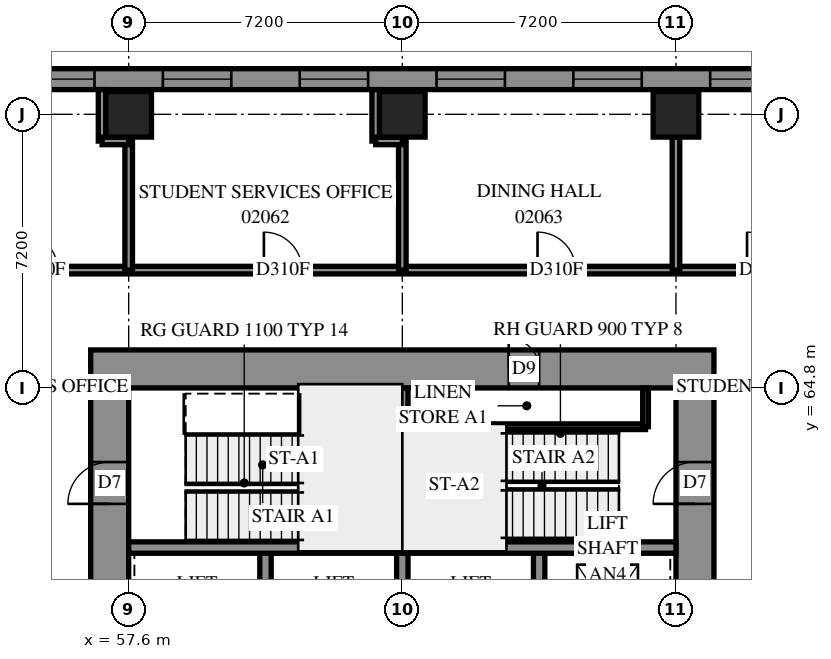
"""IFC4 building model, lengths in metres.
Left out: names, types, materials, properties, quantities, classifications, styles, units other than length and angle.
Written with IfcOpenShell. Run it as: python <this file> out.ifc"""

import sys

from ifc_helpers import new_model, si_unit, direction, frame, frame_2d, origin, origin_2d, place, context, subcontext, project, spatial, polyline, rectangle, outline, extrude, element, fill, save


model = new_model("IFC4")
c1 = context("Model", 3, precision=1e-05, world=origin(), true_north=direction((0.0, 1.0)))
c2 = subcontext(c1, "Body", "Model", "MODEL_VIEW")
j1 = project(units=[si_unit("LENGTHUNIT", "METRE"), si_unit("PLANEANGLEUNIT", "RADIAN")], contexts=[c1])
p1 = place(None, origin())
s1 = spatial("IfcSite", under=j1, at=p1, CompositionType="ELEMENT")
p2 = place(p1, origin())
s2 = spatial("IfcBuilding", under=s1, at=p2, CompositionType="ELEMENT")
p3 = place(p2, frame((0.0, 0.0, 10.2)))
s3 = spatial("IfcBuildingStorey", under=s2, at=p3, CompositionType="ELEMENT", Elevation=10.2)
for number, where, z_axis, x_axis in (
    (1, (57.6, 72.0, 0.0), (0.0, 0.0, 1.0), (1.0, 0.0, 0.0)),
    (2, (64.8, 72.0, 0.0), (0.0, 0.0, 1.0), (1.0, 0.0, 0.0)),
    (3, (72.0, 72.0, 0.0), (0.0, 0.0, 1.0), (1.0, 0.0, 0.0)),
):
    element("IfcColumn", number, at=place(p3, frame(where, z_axis=z_axis, x_axis=x_axis)), inside=s3, PredefinedType="COLUMN", context=c2, shape_type="SweptSolid", body=[
        extrude(rectangle(XDim=1.2, YDim=1.2, at=origin_2d()), origin(), (0.0, 0.0, 1.0), 3.8),
    ])
p4 = place(p3, frame((56.6, 65.3, -0.4), z_axis=(0.0, 0.0, 1.0), x_axis=(1.0, 0.0, 0.0)))
e4 = element("IfcWall", 4, at=p4, inside=s3, PredefinedType="SHEAR", context=c2, shape_type="SweptSolid", body=[
    extrude(rectangle(XDim=16.4, YDim=1.0, at=frame_2d((8.2, 0.0))), origin(), (0.0, 0.0, 1.0), 3.5),
])
p5 = place(p4, frame((11.0, 0.0, 0.4)))
e5 = element("IfcOpeningElement", 5, at=p5, cuts=e4, PredefinedType="OPENING", context=c2, shape_type="SweptSolid", body=[
    extrude(rectangle(XDim=0.8, YDim=2.1, at=frame_2d((0.4, 1.05))), frame((0.0, 0.51, 0.0), z_axis=(0.0, -1.0, 0.0), x_axis=(1.0, 0.0, 0.0)), (0.0, 0.0, 1.0), 1.02),
])
p6 = place(p3, frame((57.1, 50.4, -0.4), z_axis=(0.0, 0.0, 1.0), x_axis=(0.0, 1.0, 0.0)))
e6 = element("IfcWall", 6, at=p6, inside=s3, PredefinedType="SHEAR", context=c2, shape_type="SweptSolid", body=[
    extrude(rectangle(XDim=14.4, YDim=1.0, at=frame_2d((7.2, 0.0))), origin(), (0.0, 0.0, 1.0), 3.5),
])
p7 = place(p6, frame((4.55, 0.0, 0.4)))
e7 = element("IfcOpeningElement", 7, at=p7, cuts=e6, PredefinedType="OPENING", context=c2, shape_type="SweptSolid", body=[
    extrude(rectangle(XDim=1.1, YDim=2.1, at=frame_2d((0.55, 1.05))), frame((0.0, 0.51, 0.0), z_axis=(0.0, -1.0, 0.0), x_axis=(1.0, 0.0, 0.0)), (0.0, 0.0, 1.0), 1.02),
])
p8 = place(p6, frame((11.35, 0.0, 0.4)))
e8 = element("IfcOpeningElement", 8, at=p8, cuts=e6, PredefinedType="OPENING", context=c2, shape_type="SweptSolid", body=[
    extrude(rectangle(XDim=1.1, YDim=2.1, at=frame_2d((0.55, 1.05))), frame((0.0, 0.51, 0.0), z_axis=(0.0, -1.0, 0.0), x_axis=(1.0, 0.0, 0.0)), (0.0, 0.0, 1.0), 1.02),
])
p9 = place(p3, frame((72.5, 50.4, -0.4), z_axis=(0.0, 0.0, 1.0), x_axis=(0.0, 1.0, 0.0)))
e9 = element("IfcWall", 9, at=p9, inside=s3, PredefinedType="SHEAR", context=c2, shape_type="SweptSolid", body=[
    extrude(rectangle(XDim=14.4, YDim=1.0, at=frame_2d((7.2, 0.0))), origin(), (0.0, 0.0, 1.0), 3.5),
])
p10 = place(p9, frame((4.55, 0.0, 0.4)))
e10 = element("IfcOpeningElement", 10, at=p10, cuts=e9, PredefinedType="OPENING", context=c2, shape_type="SweptSolid", body=[
    extrude(rectangle(XDim=1.1, YDim=2.1, at=frame_2d((0.55, 1.05))), frame((0.0, 0.51, 0.0), z_axis=(0.0, -1.0, 0.0), x_axis=(1.0, 0.0, 0.0)), (0.0, 0.0, 1.0), 1.02),
])
p11 = place(p9, frame((11.35, 0.0, 0.4)))
e11 = element("IfcOpeningElement", 11, at=p11, cuts=e9, PredefinedType="OPENING", context=c2, shape_type="SweptSolid", body=[
    extrude(rectangle(XDim=1.1, YDim=2.1, at=frame_2d((0.55, 1.05))), frame((0.0, 0.51, 0.0), z_axis=(0.0, -1.0, 0.0), x_axis=(1.0, 0.0, 0.0)), (0.0, 0.0, 1.0), 1.02),
])
for number, where, z_axis, x_axis in (
    (12, (61.2, 57.3, 0.0), (0.0, 0.0, 1.0), (0.0, 1.0, 0.0)),
    (13, (64.8, 57.3, 0.0), (0.0, 0.0, 1.0), (0.0, 1.0, 0.0)),
    (14, (68.4, 57.3, 0.0), (0.0, 0.0, 1.0), (0.0, 1.0, 0.0)),
):
    element("IfcWall", number, at=place(p3, frame(where, z_axis=z_axis, x_axis=x_axis)), inside=s3, PredefinedType="SOLIDWALL", context=c2, shape_type="SweptSolid", body=[
        extrude(rectangle(XDim=3.3, YDim=0.3, at=frame_2d((1.65, 0.0))), origin(), (0.0, 0.0, 1.0), 3.8),
    ])
for number, where, z_axis, x_axis in (
    (15, (57.6, 60.6, 0.0), (0.0, 0.0, 1.0), (1.0, 0.0, 0.0)),
    (16, (64.8, 60.6, 0.0), (0.0, 0.0, 1.0), (1.0, 0.0, 0.0)),
):
    element("IfcWall", number, at=place(p3, frame(where, z_axis=z_axis, x_axis=x_axis)), inside=s3, PredefinedType="SOLIDWALL", context=c2, shape_type="SweptSolid", body=[
        extrude(rectangle(XDim=7.2, YDim=0.3, at=frame_2d((3.6, 0.0))), origin(), (0.0, 0.0, 1.0), 3.8),
    ])
p12 = place(p3, frame((64.8, 60.6, 0.0), z_axis=(0.0, 0.0, 1.0), x_axis=(0.0, 1.0, 0.0)))
e17 = element("IfcWall", 17, at=p12, inside=s3, PredefinedType="SOLIDWALL", context=c2, shape_type="SweptSolid", body=[
    extrude(rectangle(XDim=4.2, YDim=0.3, at=frame_2d((2.1, 0.0))), origin(), (0.0, 0.0, 1.0), 3.8),
])
p13 = place(p3, frame((79.583, 72.925, 0.0), z_axis=(0.0, 0.0, 1.0), x_axis=(-1.0, 0.0, 0.0)))
e18 = element("IfcWall", 18, at=p13, inside=s3, PredefinedType="SOLIDWALL", context=c2, shape_type="SweptSolid", body=[
    extrude(outline(polyline([(-0.114, -0.275), (79.583, -0.275), (79.033, 0.275), (0.114, 0.275), (-0.114, -0.275)])), origin(), (0.0, 0.0, 1.0), 3.8),
])
p14 = place(p13, frame((1.249, 0.0, 0.7)))
e19 = element("IfcOpeningElement", 19, at=p14, cuts=e18, PredefinedType="OPENING", context=c2, shape_type="SweptSolid", body=[
    extrude(rectangle(XDim=1.8, YDim=2.6, at=frame_2d((0.9, 1.3))), frame((0.0, 0.285, 0.0), z_axis=(0.0, -1.0, 0.0), x_axis=(1.0, 0.0, 0.0)), (0.0, 0.0, 1.0), 0.57),
])
p15 = place(p13, frame((4.883, 0.0, 0.7)))
e20 = element("IfcOpeningElement", 20, at=p15, cuts=e18, PredefinedType="OPENING", context=c2, shape_type="SweptSolid", body=[
    extrude(rectangle(XDim=1.8, YDim=2.6, at=frame_2d((0.9, 1.3))), frame((0.0, 0.285, 0.0), z_axis=(0.0, -1.0, 0.0), x_axis=(1.0, 0.0, 0.0)), (0.0, 0.0, 1.0), 0.57),
])
p16 = place(p13, frame((8.483, 0.0, 0.7)))
e21 = element("IfcOpeningElement", 21, at=p16, cuts=e18, PredefinedType="OPENING", context=c2, shape_type="SweptSolid", body=[
    extrude(rectangle(XDim=1.8, YDim=2.6, at=frame_2d((0.9, 1.3))), frame((0.0, 0.285, 0.0), z_axis=(0.0, -1.0, 0.0), x_axis=(1.0, 0.0, 0.0)), (0.0, 0.0, 1.0), 0.57),
])
p17 = place(p13, frame((12.083, 0.0, 0.7)))
e22 = element("IfcOpeningElement", 22, at=p17, cuts=e18, PredefinedType="OPENING", context=c2, shape_type="SweptSolid", body=[
    extrude(rectangle(XDim=1.8, YDim=2.6, at=frame_2d((0.9, 1.3))), frame((0.0, 0.285, 0.0), z_axis=(0.0, -1.0, 0.0), x_axis=(1.0, 0.0, 0.0)), (0.0, 0.0, 1.0), 0.57),
])
p18 = place(p13, frame((15.683, 0.0, 0.7)))
e23 = element("IfcOpeningElement", 23, at=p18, cuts=e18, PredefinedType="OPENING", context=c2, shape_type="SweptSolid", body=[
    extrude(rectangle(XDim=1.8, YDim=2.6, at=frame_2d((0.9, 1.3))), frame((0.0, 0.285, 0.0), z_axis=(0.0, -1.0, 0.0), x_axis=(1.0, 0.0, 0.0)), (0.0, 0.0, 1.0), 0.57),
])
p19 = place(p13, frame((19.283, 0.0, 0.7)))
e24 = element("IfcOpeningElement", 24, at=p19, cuts=e18, PredefinedType="OPENING", context=c2, shape_type="SweptSolid", body=[
    extrude(rectangle(XDim=1.8, YDim=2.6, at=frame_2d((0.9, 1.3))), frame((0.0, 0.285, 0.0), z_axis=(0.0, -1.0, 0.0), x_axis=(1.0, 0.0, 0.0)), (0.0, 0.0, 1.0), 0.57),
])
p20 = place(p13, frame((22.883, 0.0, 0.7)))
e25 = element("IfcOpeningElement", 25, at=p20, cuts=e18, PredefinedType="OPENING", context=c2, shape_type="SweptSolid", body=[
    extrude(rectangle(XDim=1.8, YDim=2.6, at=frame_2d((0.9, 1.3))), frame((0.0, 0.285, 0.0), z_axis=(0.0, -1.0, 0.0), x_axis=(1.0, 0.0, 0.0)), (0.0, 0.0, 1.0), 0.57),
])
p21 = place(p13, frame((26.483, 0.0, 0.7)))
e26 = element("IfcOpeningElement", 26, at=p21, cuts=e18, PredefinedType="OPENING", context=c2, shape_type="SweptSolid", body=[
    extrude(rectangle(XDim=1.8, YDim=2.6, at=frame_2d((0.9, 1.3))), frame((0.0, 0.285, 0.0), z_axis=(0.0, -1.0, 0.0), x_axis=(1.0, 0.0, 0.0)), (0.0, 0.0, 1.0), 0.57),
])
p22 = place(p13, frame((30.083, 0.0, 0.7)))
e27 = element("IfcOpeningElement", 27, at=p22, cuts=e18, PredefinedType="OPENING", context=c2, shape_type="SweptSolid", body=[
    extrude(rectangle(XDim=1.8, YDim=2.6, at=frame_2d((0.9, 1.3))), frame((0.0, 0.285, 0.0), z_axis=(0.0, -1.0, 0.0), x_axis=(1.0, 0.0, 0.0)), (0.0, 0.0, 1.0), 0.57),
])
p23 = place(p13, frame((33.683, 0.0, 0.7)))
e28 = element("IfcOpeningElement", 28, at=p23, cuts=e18, PredefinedType="OPENING", context=c2, shape_type="SweptSolid", body=[
    extrude(rectangle(XDim=1.8, YDim=2.6, at=frame_2d((0.9, 1.3))), frame((0.0, 0.285, 0.0), z_axis=(0.0, -1.0, 0.0), x_axis=(1.0, 0.0, 0.0)), (0.0, 0.0, 1.0), 0.57),
])
p24 = place(p13, frame((37.283, 0.0, 0.7)))
e29 = element("IfcOpeningElement", 29, at=p24, cuts=e18, PredefinedType="OPENING", context=c2, shape_type="SweptSolid", body=[
    extrude(rectangle(XDim=1.8, YDim=2.6, at=frame_2d((0.9, 1.3))), frame((0.0, 0.285, 0.0), z_axis=(0.0, -1.0, 0.0), x_axis=(1.0, 0.0, 0.0)), (0.0, 0.0, 1.0), 0.57),
])
p25 = place(p13, frame((40.883, 0.0, 0.7)))
e30 = element("IfcOpeningElement", 30, at=p25, cuts=e18, PredefinedType="OPENING", context=c2, shape_type="SweptSolid", body=[
    extrude(rectangle(XDim=1.8, YDim=2.6, at=frame_2d((0.9, 1.3))), frame((0.0, 0.285, 0.0), z_axis=(0.0, -1.0, 0.0), x_axis=(1.0, 0.0, 0.0)), (0.0, 0.0, 1.0), 0.57),
])
p26 = place(p13, frame((44.483, 0.0, 0.7)))
e31 = element("IfcOpeningElement", 31, at=p26, cuts=e18, PredefinedType="OPENING", context=c2, shape_type="SweptSolid", body=[
    extrude(rectangle(XDim=1.8, YDim=2.6, at=frame_2d((0.9, 1.3))), frame((0.0, 0.285, 0.0), z_axis=(0.0, -1.0, 0.0), x_axis=(1.0, 0.0, 0.0)), (0.0, 0.0, 1.0), 0.57),
])
p27 = place(p13, frame((48.083, 0.0, 0.7)))
e32 = element("IfcOpeningElement", 32, at=p27, cuts=e18, PredefinedType="OPENING", context=c2, shape_type="SweptSolid", body=[
    extrude(rectangle(XDim=1.8, YDim=2.6, at=frame_2d((0.9, 1.3))), frame((0.0, 0.285, 0.0), z_axis=(0.0, -1.0, 0.0), x_axis=(1.0, 0.0, 0.0)), (0.0, 0.0, 1.0), 0.57),
])
p28 = place(p13, frame((51.683, 0.0, 0.7)))
e33 = element("IfcOpeningElement", 33, at=p28, cuts=e18, PredefinedType="OPENING", context=c2, shape_type="SweptSolid", body=[
    extrude(rectangle(XDim=1.8, YDim=2.6, at=frame_2d((0.9, 1.3))), frame((0.0, 0.285, 0.0), z_axis=(0.0, -1.0, 0.0), x_axis=(1.0, 0.0, 0.0)), (0.0, 0.0, 1.0), 0.57),
])
p29 = place(p13, frame((55.283, 0.0, 0.7)))
e34 = element("IfcOpeningElement", 34, at=p29, cuts=e18, PredefinedType="OPENING", context=c2, shape_type="SweptSolid", body=[
    extrude(rectangle(XDim=1.8, YDim=2.6, at=frame_2d((0.9, 1.3))), frame((0.0, 0.285, 0.0), z_axis=(0.0, -1.0, 0.0), x_axis=(1.0, 0.0, 0.0)), (0.0, 0.0, 1.0), 0.57),
])
p30 = place(p13, frame((58.883, 0.0, 0.7)))
e35 = element("IfcOpeningElement", 35, at=p30, cuts=e18, PredefinedType="OPENING", context=c2, shape_type="SweptSolid", body=[
    extrude(rectangle(XDim=1.8, YDim=2.6, at=frame_2d((0.9, 1.3))), frame((0.0, 0.285, 0.0), z_axis=(0.0, -1.0, 0.0), x_axis=(1.0, 0.0, 0.0)), (0.0, 0.0, 1.0), 0.57),
])
p31 = place(p13, frame((62.483, 0.0, 0.7)))
e36 = element("IfcOpeningElement", 36, at=p31, cuts=e18, PredefinedType="OPENING", context=c2, shape_type="SweptSolid", body=[
    extrude(rectangle(XDim=1.8, YDim=2.6, at=frame_2d((0.9, 1.3))), frame((0.0, 0.285, 0.0), z_axis=(0.0, -1.0, 0.0), x_axis=(1.0, 0.0, 0.0)), (0.0, 0.0, 1.0), 0.57),
])
p32 = place(p13, frame((66.083, 0.0, 0.7)))
e37 = element("IfcOpeningElement", 37, at=p32, cuts=e18, PredefinedType="OPENING", context=c2, shape_type="SweptSolid", body=[
    extrude(rectangle(XDim=1.8, YDim=2.6, at=frame_2d((0.9, 1.3))), frame((0.0, 0.285, 0.0), z_axis=(0.0, -1.0, 0.0), x_axis=(1.0, 0.0, 0.0)), (0.0, 0.0, 1.0), 0.57),
])
p33 = place(p13, frame((69.683, 0.0, 0.7)))
e38 = element("IfcOpeningElement", 38, at=p33, cuts=e18, PredefinedType="OPENING", context=c2, shape_type="SweptSolid", body=[
    extrude(rectangle(XDim=1.8, YDim=2.6, at=frame_2d((0.9, 1.3))), frame((0.0, 0.285, 0.0), z_axis=(0.0, -1.0, 0.0), x_axis=(1.0, 0.0, 0.0)), (0.0, 0.0, 1.0), 0.57),
])
p34 = place(p13, frame((73.683, 0.0, 0.7)))
e39 = element("IfcOpeningElement", 39, at=p34, cuts=e18, PredefinedType="OPENING", context=c2, shape_type="SweptSolid", body=[
    extrude(rectangle(XDim=1.8, YDim=2.6, at=frame_2d((0.9, 1.3))), frame((0.0, 0.285, 0.0), z_axis=(0.0, -1.0, 0.0), x_axis=(1.0, 0.0, 0.0)), (0.0, 0.0, 1.0), 0.57),
])
p35 = place(p13, frame((76.508, 0.0, 0.7)))
e40 = element("IfcOpeningElement", 40, at=p35, cuts=e18, PredefinedType="OPENING", context=c2, shape_type="SweptSolid", body=[
    extrude(rectangle(XDim=1.8, YDim=2.6, at=frame_2d((0.9, 1.3))), frame((0.0, 0.285, 0.0), z_axis=(0.0, -1.0, 0.0), x_axis=(1.0, 0.0, 0.0)), (0.0, 0.0, 1.0), 0.57),
])
p36 = place(p3, frame((64.95, 63.78, 0.0), z_axis=(0.0, 0.0, 1.0), x_axis=(1.0, 0.0, 0.0)))
e41 = element("IfcWall", 41, at=p36, inside=s3, PredefinedType="PARTITIONING", context=c2, shape_type="SweptSolid", body=[
    extrude(rectangle(XDim=6.25, YDim=0.15, at=frame_2d((3.125, 0.0))), origin(), (0.0, 0.0, 1.0), 3.8),
])
p37 = place(p3, frame((71.2, 63.78, 0.0), z_axis=(0.0, 0.0, 1.0), x_axis=(0.0, 1.0, 0.0)))
e42 = element("IfcWall", 42, at=p37, inside=s3, PredefinedType="PARTITIONING", context=c2, shape_type="SweptSolid", body=[
    extrude(rectangle(XDim=1.02, YDim=0.15, at=frame_2d((0.51, 0.0))), origin(), (0.0, 0.0, 1.0), 3.8),
])
p38 = place(p3, frame((54.5, 67.9, 0.0), z_axis=(0.0, 0.0, 1.0), x_axis=(1.0, 0.0, 0.0)))
e43 = element("IfcWall", 43, at=p38, inside=s3, PredefinedType="PARTITIONING", context=c2, shape_type="SweptSolid", body=[
    extrude(rectangle(XDim=20.6, YDim=0.2, at=frame_2d((10.3, 0.0))), origin(), (0.0, 0.0, 1.0), 3.8),
])
p39 = place(p38, frame((0.23, 0.0, 0.0)))
e44 = element("IfcOpeningElement", 44, at=p39, cuts=e43, PredefinedType="OPENING", context=c2, shape_type="SweptSolid", body=[
    extrude(rectangle(XDim=1.0, YDim=2.1, at=frame_2d((0.5, 1.05))), frame((0.0, 0.11, 0.0), z_axis=(0.0, -1.0, 0.0), x_axis=(1.0, 0.0, 0.0)), (0.0, 0.0, 1.0), 0.22),
])
p40 = place(p38, frame((19.37, 0.0, 0.0)))
e45 = element("IfcOpeningElement", 45, at=p40, cuts=e43, PredefinedType="OPENING", context=c2, shape_type="SweptSolid", body=[
    extrude(rectangle(XDim=1.0, YDim=2.1, at=frame_2d((0.5, 1.05))), frame((0.0, 0.11, 0.0), z_axis=(0.0, -1.0, 0.0), x_axis=(1.0, 0.0, 0.0)), (0.0, 0.0, 1.0), 0.22),
])
p41 = place(p38, frame((6.657, 0.0, 0.0)))
e46 = element("IfcOpeningElement", 46, at=p41, cuts=e43, PredefinedType="OPENING", context=c2, shape_type="SweptSolid", body=[
    extrude(rectangle(XDim=1.0, YDim=2.1, at=frame_2d((0.5, 1.05))), frame((0.0, 0.11, 0.0), z_axis=(0.0, -1.0, 0.0), x_axis=(1.0, 0.0, 0.0)), (0.0, 0.0, 1.0), 0.22),
])
p42 = place(p38, frame((13.857, 0.0, 0.0)))
e47 = element("IfcOpeningElement", 47, at=p42, cuts=e43, PredefinedType="OPENING", context=c2, shape_type="SweptSolid", body=[
    extrude(rectangle(XDim=1.0, YDim=2.1, at=frame_2d((0.5, 1.05))), frame((0.0, 0.11, 0.0), z_axis=(0.0, -1.0, 0.0), x_axis=(1.0, 0.0, 0.0)), (0.0, 0.0, 1.0), 0.22),
])
p43 = place(p3, frame((72.0, 67.9, 0.0), z_axis=(0.0, 0.0, 1.0), x_axis=(0.0, 1.0, 0.0)))
e48 = element("IfcWall", 48, at=p43, inside=s3, PredefinedType="PARTITIONING", context=c2, shape_type="SweptSolid", body=[
    extrude(rectangle(XDim=3.5, YDim=0.2, at=frame_2d((1.75, 0.0))), origin(), (0.0, 0.0, 1.0), 3.8),
])
for number, where, z_axis, x_axis in (
    (49, (57.6, 67.9, 0.0), (0.0, 0.0, 1.0), (0.0, 1.0, 0.0)),
    (50, (64.8, 67.9, 0.0), (0.0, 0.0, 1.0), (0.0, 1.0, 0.0)),
):
    element("IfcWall", number, at=place(p3, frame(where, z_axis=z_axis, x_axis=x_axis)), inside=s3, PredefinedType="PARTITIONING", context=c2, shape_type="SweptSolid", body=[
        extrude(rectangle(XDim=3.396, YDim=0.2, at=frame_2d((1.698, 0.0))), origin(), (0.0, 0.0, 1.0), 3.8),
    ])
for number, where, z_axis, x_axis in (
    (51, (56.9, 71.296, 0.0), (0.0, 0.0, 1.0), (0.0, 1.0, 0.0)),
    (52, (64.1, 71.296, 0.0), (0.0, 0.0, 1.0), (0.0, 1.0, 0.0)),
):
    element("IfcWall", number, at=place(p3, frame(where, z_axis=z_axis, x_axis=x_axis)), inside=s3, PredefinedType="PARTITIONING", context=c2, shape_type="SweptSolid", body=[
        extrude(rectangle(XDim=1.354, YDim=0.2, at=frame_2d((0.677, 0.0))), origin(), (0.0, 0.0, 1.0), 3.8),
    ])
for number, where, z_axis, x_axis in (
    (53, (56.9, 71.3, 0.0), (0.0, 0.0, 1.0), (1.0, 0.0, 0.0)),
    (54, (64.1, 71.3, 0.0), (0.0, 0.0, 1.0), (1.0, 0.0, 0.0)),
):
    element("IfcWall", number, at=place(p3, frame(where, z_axis=z_axis, x_axis=x_axis)), inside=s3, PredefinedType="PARTITIONING", context=c2, shape_type="SweptSolid", body=[
        extrude(rectangle(XDim=0.7, YDim=0.2, at=frame_2d((0.35, 0.0))), origin(), (0.0, 0.0, 1.0), 3.8),
    ])
p44 = place(p15, origin())
e55 = element("IfcWindow", 55, at=p44, inside=s3, PartitioningType="SINGLE_PANEL", PredefinedType="WINDOW", context=c2, shape_type="SweptSolid", body=[
    extrude(rectangle(XDim=1.8, YDim=2.6, at=frame_2d((0.9, 1.3))), frame((0.0, 0.155, 0.0), z_axis=(0.0, -1.0, 0.0), x_axis=(1.0, 0.0, 0.0)), (0.0, 0.0, 1.0), 0.06),
])
fill(e20, e55)
p45 = place(p16, origin())
e56 = element("IfcWindow", 56, at=p45, inside=s3, PartitioningType="SINGLE_PANEL", PredefinedType="WINDOW", context=c2, shape_type="SweptSolid", body=[
    extrude(rectangle(XDim=1.8, YDim=2.6, at=frame_2d((0.9, 1.3))), frame((0.0, 0.155, 0.0), z_axis=(0.0, -1.0, 0.0), x_axis=(1.0, 0.0, 0.0)), (0.0, 0.0, 1.0), 0.06),
])
fill(e21, e56)
p46 = place(p17, origin())
e57 = element("IfcWindow", 57, at=p46, inside=s3, PartitioningType="SINGLE_PANEL", PredefinedType="WINDOW", context=c2, shape_type="SweptSolid", body=[
    extrude(rectangle(XDim=1.8, YDim=2.6, at=frame_2d((0.9, 1.3))), frame((0.0, 0.155, 0.0), z_axis=(0.0, -1.0, 0.0), x_axis=(1.0, 0.0, 0.0)), (0.0, 0.0, 1.0), 0.06),
])
fill(e22, e57)
p47 = place(p18, origin())
e58 = element("IfcWindow", 58, at=p47, inside=s3, PartitioningType="SINGLE_PANEL", PredefinedType="WINDOW", context=c2, shape_type="SweptSolid", body=[
    extrude(rectangle(XDim=1.8, YDim=2.6, at=frame_2d((0.9, 1.3))), frame((0.0, 0.155, 0.0), z_axis=(0.0, -1.0, 0.0), x_axis=(1.0, 0.0, 0.0)), (0.0, 0.0, 1.0), 0.06),
])
fill(e23, e58)
p48 = place(p19, origin())
e59 = element("IfcWindow", 59, at=p48, inside=s3, PartitioningType="SINGLE_PANEL", PredefinedType="WINDOW", context=c2, shape_type="SweptSolid", body=[
    extrude(rectangle(XDim=1.8, YDim=2.6, at=frame_2d((0.9, 1.3))), frame((0.0, 0.155, 0.0), z_axis=(0.0, -1.0, 0.0), x_axis=(1.0, 0.0, 0.0)), (0.0, 0.0, 1.0), 0.06),
])
fill(e24, e59)
p49 = place(p20, origin())
e60 = element("IfcWindow", 60, at=p49, inside=s3, PartitioningType="SINGLE_PANEL", PredefinedType="WINDOW", context=c2, shape_type="SweptSolid", body=[
    extrude(rectangle(XDim=1.8, YDim=2.6, at=frame_2d((0.9, 1.3))), frame((0.0, 0.155, 0.0), z_axis=(0.0, -1.0, 0.0), x_axis=(1.0, 0.0, 0.0)), (0.0, 0.0, 1.0), 0.06),
])
fill(e25, e60)
p50 = place(p5, origin())
e61 = element("IfcDoor", 61, at=p50, inside=s3, OperationType="SINGLE_SWING_RIGHT", PredefinedType="DOOR", context=c2, shape_type="SweptSolid", body=[
    extrude(rectangle(XDim=0.8, YDim=2.1, at=frame_2d((0.4, 1.05))), frame((0.0, -0.44, 0.0), z_axis=(0.0, -1.0, 0.0), x_axis=(1.0, 0.0, 0.0)), (0.0, 0.0, 1.0), 0.05),
])
fill(e5, e61)
p51 = place(p8, origin())
e62 = element("IfcDoor", 62, at=p51, inside=s3, OperationType="SINGLE_SWING_LEFT", PredefinedType="DOOR", context=c2, shape_type="SweptSolid", body=[
    extrude(rectangle(XDim=1.1, YDim=2.1, at=frame_2d((0.55, 1.05))), frame((0.0, 0.025, 0.0), z_axis=(0.0, -1.0, 0.0), x_axis=(1.0, 0.0, 0.0)), (0.0, 0.0, 1.0), 0.05),
])
fill(e8, e62)
p52 = place(p11, origin())
e63 = element("IfcDoor", 63, at=p52, inside=s3, OperationType="SINGLE_SWING_RIGHT", PredefinedType="DOOR", context=c2, shape_type="SweptSolid", body=[
    extrude(rectangle(XDim=1.1, YDim=2.1, at=frame_2d((0.55, 1.05))), frame((0.0, 0.025, 0.0), z_axis=(0.0, -1.0, 0.0), x_axis=(1.0, 0.0, 0.0)), (0.0, 0.0, 1.0), 0.05),
])
fill(e11, e63)
p53 = place(p39, origin())
e64 = element("IfcDoor", 64, at=p53, inside=s3, OperationType="SINGLE_SWING_LEFT", PredefinedType="DOOR", context=c2, shape_type="SweptSolid", body=[
    extrude(rectangle(XDim=1.0, YDim=2.1, at=frame_2d((0.5, 1.05))), frame((0.0, 0.025, 0.0), z_axis=(0.0, -1.0, 0.0), x_axis=(1.0, 0.0, 0.0)), (0.0, 0.0, 1.0), 0.05),
])
fill(e44, e64)
p54 = place(p40, origin())
e65 = element("IfcDoor", 65, at=p54, inside=s3, OperationType="SINGLE_SWING_RIGHT", PredefinedType="DOOR", context=c2, shape_type="SweptSolid", body=[
    extrude(rectangle(XDim=1.0, YDim=2.1, at=frame_2d((0.5, 1.05))), frame((0.0, 0.025, 0.0), z_axis=(0.0, -1.0, 0.0), x_axis=(1.0, 0.0, 0.0)), (0.0, 0.0, 1.0), 0.05),
])
fill(e45, e65)
p55 = place(p41, origin())
e66 = element("IfcDoor", 66, at=p55, inside=s3, OperationType="SINGLE_SWING_RIGHT", PredefinedType="DOOR", context=c2, shape_type="SweptSolid", body=[
    extrude(rectangle(XDim=1.0, YDim=2.1, at=frame_2d((0.5, 1.05))), frame((0.0, 0.025, 0.0), z_axis=(0.0, -1.0, 0.0), x_axis=(1.0, 0.0, 0.0)), (0.0, 0.0, 1.0), 0.05),
])
fill(e46, e66)
p56 = place(p42, origin())
e67 = element("IfcDoor", 67, at=p56, inside=s3, OperationType="SINGLE_SWING_RIGHT", PredefinedType="DOOR", context=c2, shape_type="SweptSolid", body=[
    extrude(rectangle(XDim=1.0, YDim=2.1, at=frame_2d((0.5, 1.05))), frame((0.0, 0.025, 0.0), z_axis=(0.0, -1.0, 0.0), x_axis=(1.0, 0.0, 0.0)), (0.0, 0.0, 1.0), 0.05),
])
fill(e47, e67)
save(model, sys.argv[1])
